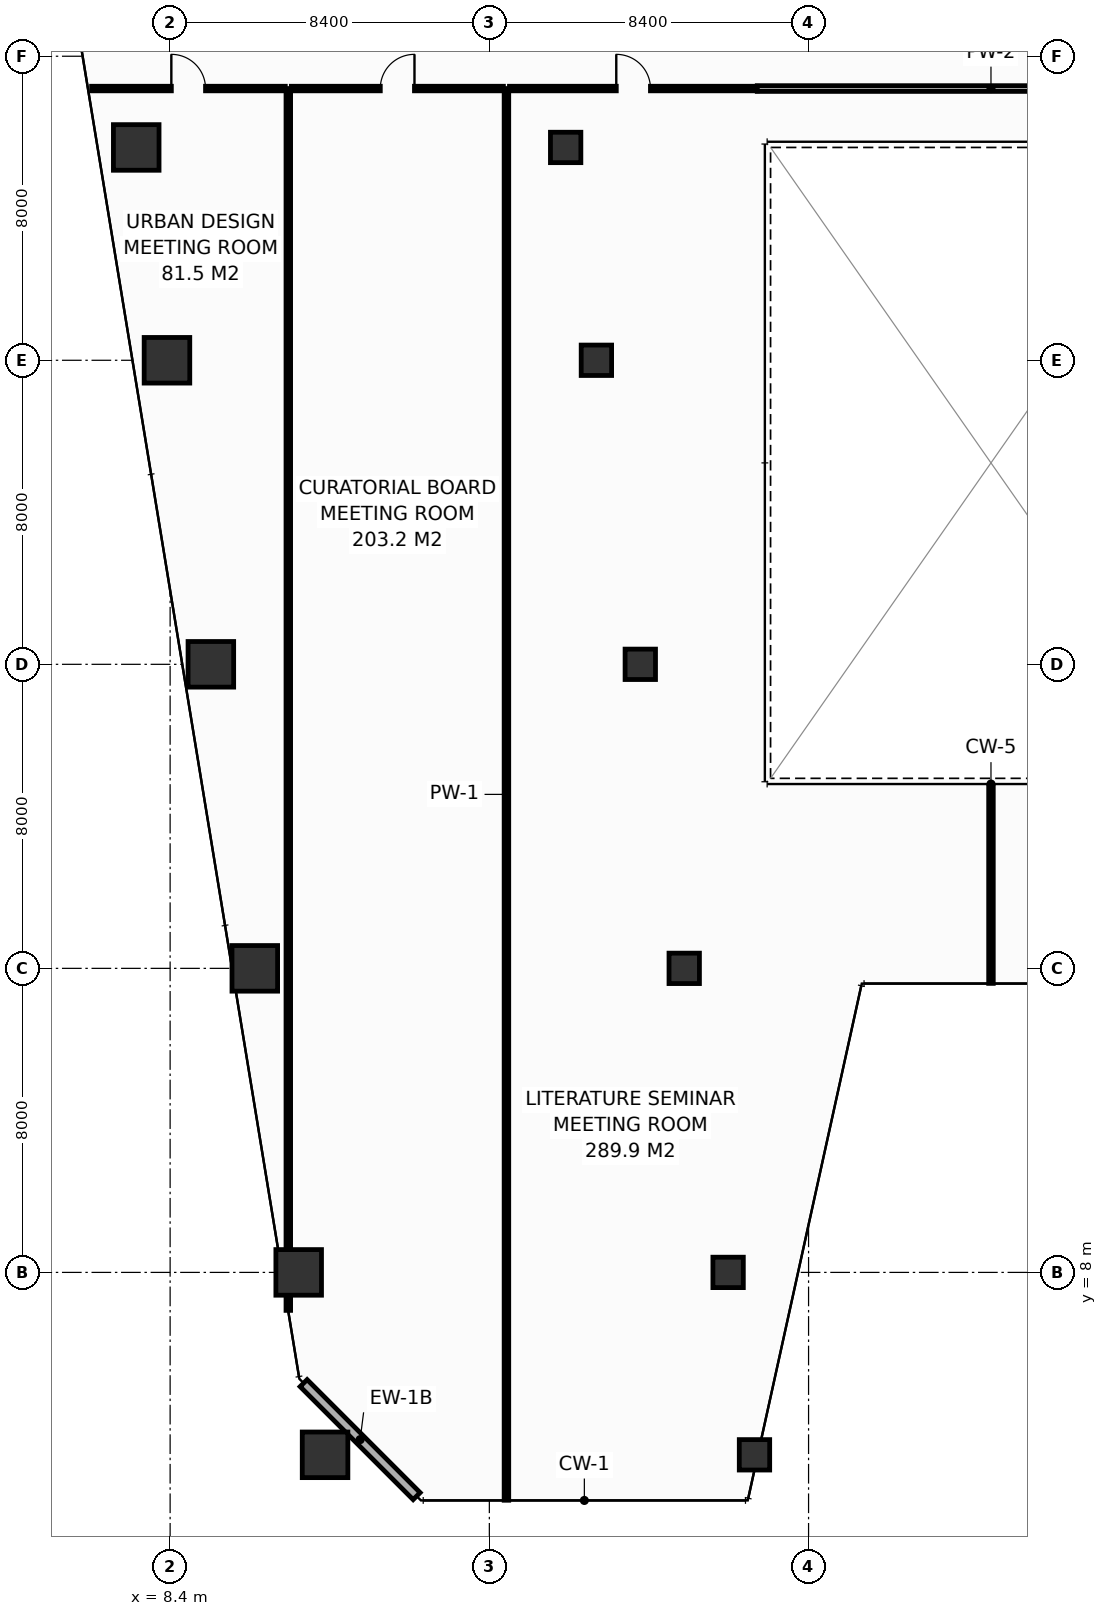
"""IFC4 building model, lengths in metres.
Left out: names, types, materials, properties, quantities, classifications, styles, units other than length and angle.
Written with IfcOpenShell. Run it as: python <this file> out.ifc"""

import sys

from ifc_helpers import new_model, si_unit, direction, frame, frame_2d, origin, origin_2d, place, context, subcontext, project, spatial, rectangle, hollow_rectangle, extrude, element, fill, save


model = new_model("IFC4")
c1 = context("Model", 3, precision=1e-05, world=origin(), true_north=direction((0.0, 1.0)))
c2 = subcontext(c1, "Body", "Model", "MODEL_VIEW")
j1 = project(units=[si_unit("LENGTHUNIT", "METRE"), si_unit("PLANEANGLEUNIT", "RADIAN")], contexts=[c1])
p1 = place(None, origin())
s1 = spatial("IfcSite", under=j1, at=p1, CompositionType="ELEMENT")
p2 = place(p1, origin())
s2 = spatial("IfcBuilding", under=s1, at=p2, CompositionType="ELEMENT")
p3 = place(p2, frame((0.0, 0.0, 97.2)))
s3 = spatial("IfcBuildingStorey", under=s2, at=p3, CompositionType="ELEMENT", Elevation=97.2)
p4 = place(p3, frame((12.477, 3.2, 0.0), z_axis=(0.0, 0.0, 1.0), x_axis=(1.0, 0.0, 0.0)))
e1 = element("IfcColumn", 1, at=p4, inside=s3, PredefinedType="COLUMN", context=c2, shape_type="SweptSolid", body=[
    extrude(hollow_rectangle(XDim=1.2, YDim=1.2, WallThickness=0.055, at=origin_2d()), origin(), (0.0, 0.0, 1.0), 4.4),
])
p5 = place(p3, frame((23.777, 3.2, 0.0), z_axis=(0.0, 0.0, 1.0), x_axis=(1.0, 0.0, 0.0)))
e2 = element("IfcColumn", 2, at=p5, inside=s3, PredefinedType="COLUMN", context=c2, shape_type="SweptSolid", body=[
    extrude(hollow_rectangle(XDim=0.8, YDim=0.8, WallThickness=0.036, at=origin_2d()), origin(), (0.0, 0.0, 1.0), 4.4),
])
p6 = place(p3, frame((11.783, 8.0, 0.0), z_axis=(0.0, 0.0, 1.0), x_axis=(1.0, 0.0, 0.0)))
e3 = element("IfcColumn", 3, at=p6, inside=s3, PredefinedType="COLUMN", context=c2, shape_type="SweptSolid", body=[
    extrude(hollow_rectangle(XDim=1.2, YDim=1.2, WallThickness=0.055, at=origin_2d()), origin(), (0.0, 0.0, 1.0), 4.4),
])
p7 = place(p3, frame((23.083, 8.0, 0.0), z_axis=(0.0, 0.0, 1.0), x_axis=(1.0, 0.0, 0.0)))
e4 = element("IfcColumn", 4, at=p7, inside=s3, PredefinedType="COLUMN", context=c2, shape_type="SweptSolid", body=[
    extrude(hollow_rectangle(XDim=0.8, YDim=0.8, WallThickness=0.036, at=origin_2d()), origin(), (0.0, 0.0, 1.0), 4.4),
])
p8 = place(p3, frame((10.628, 16.0, 0.0), z_axis=(0.0, 0.0, 1.0), x_axis=(1.0, 0.0, 0.0)))
e5 = element("IfcColumn", 5, at=p8, inside=s3, PredefinedType="COLUMN", context=c2, shape_type="SweptSolid", body=[
    extrude(hollow_rectangle(XDim=1.2, YDim=1.2, WallThickness=0.055, at=origin_2d()), origin(), (0.0, 0.0, 1.0), 4.4),
])
p9 = place(p3, frame((21.928, 16.0, 0.0), z_axis=(0.0, 0.0, 1.0), x_axis=(1.0, 0.0, 0.0)))
e6 = element("IfcColumn", 6, at=p9, inside=s3, PredefinedType="COLUMN", context=c2, shape_type="SweptSolid", body=[
    extrude(hollow_rectangle(XDim=0.8, YDim=0.8, WallThickness=0.036, at=origin_2d()), origin(), (0.0, 0.0, 1.0), 4.4),
])
p10 = place(p3, frame((9.472, 24.0, 0.0), z_axis=(0.0, 0.0, 1.0), x_axis=(1.0, 0.0, 0.0)))
e7 = element("IfcColumn", 7, at=p10, inside=s3, PredefinedType="COLUMN", context=c2, shape_type="SweptSolid", body=[
    extrude(hollow_rectangle(XDim=1.2, YDim=1.2, WallThickness=0.055, at=origin_2d()), origin(), (0.0, 0.0, 1.0), 4.4),
])
p11 = place(p3, frame((20.772, 24.0, 0.0), z_axis=(0.0, 0.0, 1.0), x_axis=(1.0, 0.0, 0.0)))
e8 = element("IfcColumn", 8, at=p11, inside=s3, PredefinedType="COLUMN", context=c2, shape_type="SweptSolid", body=[
    extrude(hollow_rectangle(XDim=0.8, YDim=0.8, WallThickness=0.036, at=origin_2d()), origin(), (0.0, 0.0, 1.0), 4.4),
])
p12 = place(p3, frame((8.317, 32.0, 0.0), z_axis=(0.0, 0.0, 1.0), x_axis=(1.0, 0.0, 0.0)))
e9 = element("IfcColumn", 9, at=p12, inside=s3, PredefinedType="COLUMN", context=c2, shape_type="SweptSolid", body=[
    extrude(hollow_rectangle(XDim=1.2, YDim=1.2, WallThickness=0.055, at=origin_2d()), origin(), (0.0, 0.0, 1.0), 4.4),
])
p13 = place(p3, frame((19.617, 32.0, 0.0), z_axis=(0.0, 0.0, 1.0), x_axis=(1.0, 0.0, 0.0)))
e10 = element("IfcColumn", 10, at=p13, inside=s3, PredefinedType="COLUMN", context=c2, shape_type="SweptSolid", body=[
    extrude(hollow_rectangle(XDim=0.8, YDim=0.8, WallThickness=0.036, at=origin_2d()), origin(), (0.0, 0.0, 1.0), 4.4),
])
p14 = place(p3, frame((7.508, 37.6, 0.0), z_axis=(0.0, 0.0, 1.0), x_axis=(1.0, 0.0, 0.0)))
e11 = element("IfcColumn", 11, at=p14, inside=s3, PredefinedType="COLUMN", context=c2, shape_type="SweptSolid", body=[
    extrude(hollow_rectangle(XDim=1.2, YDim=1.2, WallThickness=0.055, at=origin_2d()), origin(), (0.0, 0.0, 1.0), 4.4),
])
p15 = place(p3, frame((18.808, 37.6, 0.0), z_axis=(0.0, 0.0, 1.0), x_axis=(1.0, 0.0, 0.0)))
e12 = element("IfcColumn", 12, at=p15, inside=s3, PredefinedType="COLUMN", context=c2, shape_type="SweptSolid", body=[
    extrude(hollow_rectangle(XDim=0.8, YDim=0.8, WallThickness=0.036, at=origin_2d()), origin(), (0.0, 0.0, 1.0), 4.4),
])
p16 = place(p3, frame((11.913, 5.087, 0.0), z_axis=(0.0, 0.0, 1.0), x_axis=(0.707106781187, -0.707106781187, 0.0)))
e13 = element("IfcWall", 13, at=p16, inside=s3, PredefinedType="STANDARD", context=c2, shape_type="SweptSolid", body=[
    extrude(rectangle(XDim=4.206, YDim=0.26, at=frame_2d((2.103, 0.0))), origin(), (0.0, 0.0, 1.0), 4.15),
])
p17 = place(p3, frame((11.51, 7.001, 0.0), z_axis=(0.0, 0.0, 1.0), x_axis=(0.0, 1.0, 0.0)))
e14 = element("IfcWall", 14, at=p17, inside=s3, PredefinedType="PARTITIONING", context=c2, shape_type="SweptSolid", body=[
    extrude(rectangle(XDim=32.149, YDim=0.12, at=frame_2d((16.075, 0.0))), origin(), (0.0, 0.0, 1.0), 2.335),
])
p18 = place(p3, frame((17.25, 2.005, 0.0), z_axis=(0.0, 0.0, 1.0), x_axis=(0.0, 1.0, 0.0)))
e15 = element("IfcWall", 15, at=p18, inside=s3, PredefinedType="PARTITIONING", context=c2, shape_type="SweptSolid", body=[
    extrude(rectangle(XDim=37.145, YDim=0.12, at=frame_2d((18.573, 0.0))), origin(), (0.0, 0.0, 1.0), 2.335),
])
p19 = place(p3, frame((30.0, 15.605, 0.0), z_axis=(0.0, 0.0, 1.0), x_axis=(0.0, 1.0, 0.0)))
e16 = element("IfcWall", 16, at=p19, inside=s3, PredefinedType="PARTITIONING", context=c2, shape_type="SweptSolid", body=[
    extrude(rectangle(XDim=5.175, YDim=0.12, at=frame_2d((2.587, 0.0))), origin(), (0.0, 0.0, 1.0), 4.15),
])
p20 = place(p3, frame((6.334, 39.15, 0.0), z_axis=(0.0, 0.0, 1.0), x_axis=(1.0, 0.0, 0.0)))
e17 = element("IfcWall", 17, at=p20, inside=s3, PredefinedType="PARTITIONING", context=c2, shape_type="SweptSolid", body=[
    extrude(rectangle(XDim=5.096, YDim=0.12, at=frame_2d((2.548, 0.0))), origin(), (0.0, 0.0, 1.0), 3.635),
])
p21 = place(p20, frame((2.098, 0.0, 0.0)))
e18 = element("IfcOpeningElement", 18, at=p21, cuts=e17, PredefinedType="OPENING", context=c2, shape_type="SweptSolid", body=[
    extrude(rectangle(XDim=0.9, YDim=2.1, at=frame_2d((0.45, 1.05))), frame((0.0, 0.07, 0.0), z_axis=(0.0, -1.0, 0.0), x_axis=(1.0, 0.0, 0.0)), (0.0, 0.0, 1.0), 0.14),
])
p22 = place(p3, frame((11.59, 39.15, 0.0), z_axis=(0.0, 0.0, 1.0), x_axis=(1.0, 0.0, 0.0)))
e19 = element("IfcWall", 19, at=p22, inside=s3, PredefinedType="PARTITIONING", context=c2, shape_type="SweptSolid", body=[
    extrude(rectangle(XDim=5.58, YDim=0.12, at=frame_2d((2.79, 0.0))), origin(), (0.0, 0.0, 1.0), 4.15),
])
p23 = place(p22, frame((2.34, 0.0, 0.0)))
e20 = element("IfcOpeningElement", 20, at=p23, cuts=e19, PredefinedType="OPENING", context=c2, shape_type="SweptSolid", body=[
    extrude(rectangle(XDim=0.9, YDim=2.1, at=frame_2d((0.45, 1.05))), frame((0.0, 0.07, 0.0), z_axis=(0.0, -1.0, 0.0), x_axis=(1.0, 0.0, 0.0)), (0.0, 0.0, 1.0), 0.14),
])
p24 = place(p3, frame((17.33, 39.15, 0.0), z_axis=(0.0, 0.0, 1.0), x_axis=(1.0, 0.0, 0.0)))
e21 = element("IfcWall", 21, at=p24, inside=s3, PredefinedType="PARTITIONING", context=c2, shape_type="SweptSolid", body=[
    extrude(rectangle(XDim=6.52, YDim=0.12, at=frame_2d((3.26, 0.0))), origin(), (0.0, 0.0, 1.0), 2.735),
])
p25 = place(p24, frame((2.81, 0.0, 0.0)))
e22 = element("IfcOpeningElement", 22, at=p25, cuts=e21, PredefinedType="OPENING", context=c2, shape_type="SweptSolid", body=[
    extrude(rectangle(XDim=0.9, YDim=2.1, at=frame_2d((0.45, 1.05))), frame((0.0, 0.07, 0.0), z_axis=(0.0, -1.0, 0.0), x_axis=(1.0, 0.0, 0.0)), (0.0, 0.0, 1.0), 0.14),
])
p26 = place(p3, frame((23.85, 39.15, 0.0), z_axis=(0.0, 0.0, 1.0), x_axis=(1.0, 0.0, 0.0)))
e23 = element("IfcWall", 23, at=p26, inside=s3, PredefinedType="PARTITIONING", context=c2, shape_type="SweptSolid", body=[
    extrude(rectangle(XDim=12.3, YDim=0.15, at=frame_2d((6.15, 0.0))), origin(), (0.0, 0.0, 1.0), 4.15),
])
p27 = place(p21, origin())
e24 = element("IfcDoor", 24, at=p27, inside=s3, OperationType="SINGLE_SWING_LEFT", PredefinedType="DOOR", context=c2, shape_type="SweptSolid", body=[
    extrude(rectangle(XDim=0.9, YDim=2.1, at=frame_2d((0.45, 1.05))), frame((0.0, 0.025, 0.0), z_axis=(0.0, -1.0, 0.0), x_axis=(1.0, 0.0, 0.0)), (0.0, 0.0, 1.0), 0.05),
])
fill(e18, e24)
p28 = place(p23, origin())
e25 = element("IfcDoor", 25, at=p28, inside=s3, OperationType="SINGLE_SWING_RIGHT", PredefinedType="DOOR", context=c2, shape_type="SweptSolid", body=[
    extrude(rectangle(XDim=0.9, YDim=2.1, at=frame_2d((0.45, 1.05))), frame((0.0, 0.025, 0.0), z_axis=(0.0, -1.0, 0.0), x_axis=(1.0, 0.0, 0.0)), (0.0, 0.0, 1.0), 0.05),
])
fill(e20, e25)
p29 = place(p25, origin())
e26 = element("IfcDoor", 26, at=p29, inside=s3, OperationType="SINGLE_SWING_LEFT", PredefinedType="DOOR", context=c2, shape_type="SweptSolid", body=[
    extrude(rectangle(XDim=0.9, YDim=2.1, at=frame_2d((0.45, 1.05))), frame((0.0, 0.025, 0.0), z_axis=(0.0, -1.0, 0.0), x_axis=(1.0, 0.0, 0.0)), (0.0, 0.0, 1.0), 0.05),
])
fill(e22, e26)
save(model, sys.argv[1])
